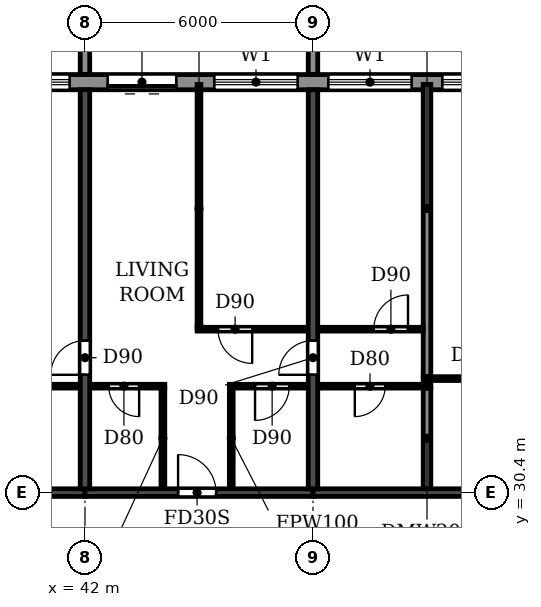
"""IFC4 building model, lengths in metres.
Left out: names, types, materials, properties, quantities, classifications, styles, units other than length and angle.
Written with IfcOpenShell. Run it as: python <this file> out.ifc"""

import sys

from ifc_helpers import new_model, si_unit, direction, frame, frame_2d, origin, place, context, subcontext, project, spatial, polyline, rectangle, outline, extrude, source, transform, mapped, element, fill, save


model = new_model("IFC4")
c1 = context("Model", 3, precision=1e-05, world=origin(), true_north=direction((0.0, 1.0)))
c2 = subcontext(c1, "Body", "Model", "MODEL_VIEW")
j1 = project(units=[si_unit("LENGTHUNIT", "METRE"), si_unit("PLANEANGLEUNIT", "RADIAN")], contexts=[c1])
p1 = place(None, origin())
s1 = spatial("IfcSite", under=j1, at=p1, CompositionType="ELEMENT")
p2 = place(p1, origin())
s2 = spatial("IfcBuilding", under=s1, at=p2, CompositionType="ELEMENT")
p3 = place(p2, frame((0.0, 0.0, 181.8)))
s3 = spatial("IfcBuildingStorey", under=s2, at=p3, CompositionType="ELEMENT", Elevation=181.8)
p4 = place(p3, frame((42.0, 30.5, 0.0), z_axis=(0.0, 0.0, 1.0), x_axis=(0.0, 1.0, 0.0)))
e1 = element("IfcWall", 1, at=p4, inside=s3, PredefinedType="SHEAR", context=c2, shape_type="SweptSolid", body=[
    extrude(rectangle(XDim=10.5, YDim=0.25, at=frame_2d((5.25, 0.0))), origin(), (0.0, 0.0, 1.0), 3.08),
])
p5 = place(p4, frame((3.0, 0.0, 0.0)))
e2 = element("IfcOpeningElement", 2, at=p5, cuts=e1, PredefinedType="OPENING", context=c2, shape_type="SweptSolid", body=[
    extrude(rectangle(XDim=0.9, YDim=2.1, at=frame_2d((0.45, 1.05))), frame((0.0, 0.135, 0.0), z_axis=(0.0, -1.0, 0.0), x_axis=(1.0, 0.0, 0.0)), (0.0, 0.0, 1.0), 0.27),
])
p6 = place(p3, frame((48.0, 30.5, 0.0), z_axis=(0.0, 0.0, 1.0), x_axis=(0.0, 1.0, 0.0)))
e3 = element("IfcWall", 3, at=p6, inside=s3, PredefinedType="SHEAR", context=c2, shape_type="SweptSolid", body=[
    extrude(rectangle(XDim=10.5, YDim=0.25, at=frame_2d((5.25, 0.0))), origin(), (0.0, 0.0, 1.0), 3.08),
])
p7 = place(p6, frame((3.0, 0.0, 0.0)))
e4 = element("IfcOpeningElement", 4, at=p7, cuts=e3, PredefinedType="OPENING", context=c2, shape_type="SweptSolid", body=[
    extrude(rectangle(XDim=0.9, YDim=2.1, at=frame_2d((0.45, 1.05))), frame((0.0, 0.135, 0.0), z_axis=(0.0, -1.0, 0.0), x_axis=(1.0, 0.0, 0.0)), (0.0, 0.0, 1.0), 0.27),
])
p8 = place(p3, frame((36.0, 30.4, 0.0), z_axis=(0.0, 0.0, 1.0), x_axis=(1.0, 0.0, 0.0)))
e5 = element("IfcWall", 5, at=p8, inside=s3, PredefinedType="SHEAR", context=c2, shape_type="SweptSolid", body=[
    extrude(rectangle(XDim=6.0, YDim=0.2, at=frame_2d((3.0, 0.0))), origin(), (0.0, 0.0, 1.0), 2.48),
])
p9 = place(p3, frame((42.0, 30.4, 0.0), z_axis=(0.0, 0.0, 1.0), x_axis=(1.0, 0.0, 0.0)))
e6 = element("IfcWall", 6, at=p9, inside=s3, PredefinedType="SHEAR", context=c2, shape_type="SweptSolid", body=[
    extrude(rectangle(XDim=6.0, YDim=0.2, at=frame_2d((3.0, 0.0))), origin(), (0.0, 0.0, 1.0), 2.48),
])
p10 = place(p9, frame((2.45, 0.0, 0.0)))
e7 = element("IfcOpeningElement", 7, at=p10, cuts=e6, PredefinedType="OPENING", context=c2, shape_type="SweptSolid", body=[
    extrude(rectangle(XDim=1.0, YDim=2.1, at=frame_2d((0.5, 1.05))), frame((0.0, 0.11, 0.0), z_axis=(0.0, -1.0, 0.0), x_axis=(1.0, 0.0, 0.0)), (0.0, 0.0, 1.0), 0.22),
])
p11 = place(p3, frame((48.0, 30.4, 0.0), z_axis=(0.0, 0.0, 1.0), x_axis=(1.0, 0.0, 0.0)))
e8 = element("IfcWall", 8, at=p11, inside=s3, PredefinedType="SHEAR", context=c2, shape_type="SweptSolid", body=[
    extrude(rectangle(XDim=6.0, YDim=0.2, at=frame_2d((3.0, 0.0))), origin(), (0.0, 0.0, 1.0), 2.48),
])
p12 = place(p3, frame((79.317, 41.2, 0.0), z_axis=(0.0, 0.0, 1.0), x_axis=(-1.0, 0.0, 0.0)))
e9 = element("IfcWall", 9, at=p12, inside=s3, PredefinedType="STANDARD", context=c2, shape_type="SweptSolid", body=[
    extrude(rectangle(XDim=56.634, YDim=0.4, at=frame_2d((28.317, 0.0))), origin(), (0.0, 0.0, 1.0), 3.08),
])
p13 = place(p12, frame((52.917, 0.0, 0.0)))
e10 = element("IfcOpeningElement", 10, at=p13, cuts=e9, PredefinedType="OPENING", context=c2, shape_type="SweptSolid", body=[
    extrude(rectangle(XDim=1.8, YDim=2.4, at=frame_2d((0.9, 1.2))), frame((0.0, 0.21, 0.0), z_axis=(0.0, -1.0, 0.0), x_axis=(1.0, 0.0, 0.0)), (0.0, 0.0, 1.0), 0.42),
])
p14 = place(p12, frame((49.717, 0.0, 0.9)))
e11 = element("IfcOpeningElement", 11, at=p14, cuts=e9, PredefinedType="OPENING", context=c2, shape_type="SweptSolid", body=[
    extrude(rectangle(XDim=2.2, YDim=1.5, at=frame_2d((1.1, 0.75))), frame((0.0, 0.21, 0.0), z_axis=(0.0, -1.0, 0.0), x_axis=(1.0, 0.0, 0.0)), (0.0, 0.0, 1.0), 0.42),
])
p15 = place(p12, frame((46.717, 0.0, 0.9)))
e12 = element("IfcOpeningElement", 12, at=p15, cuts=e9, PredefinedType="OPENING", context=c2, shape_type="SweptSolid", body=[
    extrude(rectangle(XDim=2.2, YDim=1.5, at=frame_2d((1.1, 0.75))), frame((0.0, 0.21, 0.0), z_axis=(0.0, -1.0, 0.0), x_axis=(1.0, 0.0, 0.0)), (0.0, 0.0, 1.0), 0.42),
])
p16 = place(p12, frame((43.917, 0.0, 0.0)))
e13 = element("IfcOpeningElement", 13, at=p16, cuts=e9, PredefinedType="OPENING", context=c2, shape_type="SweptSolid", body=[
    extrude(rectangle(XDim=1.8, YDim=2.4, at=frame_2d((0.9, 1.2))), frame((0.0, 0.21, 0.0), z_axis=(0.0, -1.0, 0.0), x_axis=(1.0, 0.0, 0.0)), (0.0, 0.0, 1.0), 0.42),
])
p17 = place(p12, frame((40.717, 0.0, 0.9)))
e14 = element("IfcOpeningElement", 14, at=p17, cuts=e9, PredefinedType="OPENING", context=c2, shape_type="SweptSolid", body=[
    extrude(rectangle(XDim=2.2, YDim=1.5, at=frame_2d((1.1, 0.75))), frame((0.0, 0.21, 0.0), z_axis=(0.0, -1.0, 0.0), x_axis=(1.0, 0.0, 0.0)), (0.0, 0.0, 1.0), 0.42),
])
p18 = place(p12, frame((37.717, 0.0, 0.9)))
e15 = element("IfcOpeningElement", 15, at=p18, cuts=e9, PredefinedType="OPENING", context=c2, shape_type="SweptSolid", body=[
    extrude(rectangle(XDim=2.2, YDim=1.5, at=frame_2d((1.1, 0.75))), frame((0.0, 0.21, 0.0), z_axis=(0.0, -1.0, 0.0), x_axis=(1.0, 0.0, 0.0)), (0.0, 0.0, 1.0), 0.42),
])
p19 = place(p12, frame((34.917, 0.0, 0.0)))
e16 = element("IfcOpeningElement", 16, at=p19, cuts=e9, PredefinedType="OPENING", context=c2, shape_type="SweptSolid", body=[
    extrude(rectangle(XDim=1.8, YDim=2.4, at=frame_2d((0.9, 1.2))), frame((0.0, 0.21, 0.0), z_axis=(0.0, -1.0, 0.0), x_axis=(1.0, 0.0, 0.0)), (0.0, 0.0, 1.0), 0.42),
])
p20 = place(p12, frame((31.717, 0.0, 0.9)))
e17 = element("IfcOpeningElement", 17, at=p20, cuts=e9, PredefinedType="OPENING", context=c2, shape_type="SweptSolid", body=[
    extrude(rectangle(XDim=2.2, YDim=1.5, at=frame_2d((1.1, 0.75))), frame((0.0, 0.21, 0.0), z_axis=(0.0, -1.0, 0.0), x_axis=(1.0, 0.0, 0.0)), (0.0, 0.0, 1.0), 0.42),
])
p21 = place(p12, frame((28.717, 0.0, 0.9)))
e18 = element("IfcOpeningElement", 18, at=p21, cuts=e9, PredefinedType="OPENING", context=c2, shape_type="SweptSolid", body=[
    extrude(rectangle(XDim=2.2, YDim=1.5, at=frame_2d((1.1, 0.75))), frame((0.0, 0.21, 0.0), z_axis=(0.0, -1.0, 0.0), x_axis=(1.0, 0.0, 0.0)), (0.0, 0.0, 1.0), 0.42),
])
p22 = place(p12, frame((25.717, 0.0, 0.9)))
e19 = element("IfcOpeningElement", 19, at=p22, cuts=e9, PredefinedType="OPENING", context=c2, shape_type="SweptSolid", body=[
    extrude(rectangle(XDim=2.2, YDim=1.5, at=frame_2d((1.1, 0.75))), frame((0.0, 0.21, 0.0), z_axis=(0.0, -1.0, 0.0), x_axis=(1.0, 0.0, 0.0)), (0.0, 0.0, 1.0), 0.42),
])
p23 = place(p12, frame((22.917, 0.0, 0.0)))
e20 = element("IfcOpeningElement", 20, at=p23, cuts=e9, PredefinedType="OPENING", context=c2, shape_type="SweptSolid", body=[
    extrude(rectangle(XDim=1.8, YDim=2.4, at=frame_2d((0.9, 1.2))), frame((0.0, 0.21, 0.0), z_axis=(0.0, -1.0, 0.0), x_axis=(1.0, 0.0, 0.0)), (0.0, 0.0, 1.0), 0.42),
])
p24 = place(p12, frame((19.717, 0.0, 0.9)))
e21 = element("IfcOpeningElement", 21, at=p24, cuts=e9, PredefinedType="OPENING", context=c2, shape_type="SweptSolid", body=[
    extrude(rectangle(XDim=2.2, YDim=1.5, at=frame_2d((1.1, 0.75))), frame((0.0, 0.21, 0.0), z_axis=(0.0, -1.0, 0.0), x_axis=(1.0, 0.0, 0.0)), (0.0, 0.0, 1.0), 0.42),
])
p25 = place(p12, frame((16.917, 0.0, 0.0)))
e22 = element("IfcOpeningElement", 22, at=p25, cuts=e9, PredefinedType="OPENING", context=c2, shape_type="SweptSolid", body=[
    extrude(rectangle(XDim=1.8, YDim=2.4, at=frame_2d((0.9, 1.2))), frame((0.0, 0.21, 0.0), z_axis=(0.0, -1.0, 0.0), x_axis=(1.0, 0.0, 0.0)), (0.0, 0.0, 1.0), 0.42),
])
p26 = place(p12, frame((13.717, 0.0, 0.9)))
e23 = element("IfcOpeningElement", 23, at=p26, cuts=e9, PredefinedType="OPENING", context=c2, shape_type="SweptSolid", body=[
    extrude(rectangle(XDim=2.2, YDim=1.5, at=frame_2d((1.1, 0.75))), frame((0.0, 0.21, 0.0), z_axis=(0.0, -1.0, 0.0), x_axis=(1.0, 0.0, 0.0)), (0.0, 0.0, 1.0), 0.42),
])
p27 = place(p12, frame((10.917, 0.0, 0.0)))
e24 = element("IfcOpeningElement", 24, at=p27, cuts=e9, PredefinedType="OPENING", context=c2, shape_type="SweptSolid", body=[
    extrude(rectangle(XDim=1.8, YDim=2.4, at=frame_2d((0.9, 1.2))), frame((0.0, 0.21, 0.0), z_axis=(0.0, -1.0, 0.0), x_axis=(1.0, 0.0, 0.0)), (0.0, 0.0, 1.0), 0.42),
])
p28 = place(p12, frame((7.717, 0.0, 0.9)))
e25 = element("IfcOpeningElement", 25, at=p28, cuts=e9, PredefinedType="OPENING", context=c2, shape_type="SweptSolid", body=[
    extrude(rectangle(XDim=2.2, YDim=1.5, at=frame_2d((1.1, 0.75))), frame((0.0, 0.21, 0.0), z_axis=(0.0, -1.0, 0.0), x_axis=(1.0, 0.0, 0.0)), (0.0, 0.0, 1.0), 0.42),
])
p29 = place(p12, frame((4.717, 0.0, 0.9)))
e26 = element("IfcOpeningElement", 26, at=p29, cuts=e9, PredefinedType="OPENING", context=c2, shape_type="SweptSolid", body=[
    extrude(rectangle(XDim=2.2, YDim=1.5, at=frame_2d((1.1, 0.75))), frame((0.0, 0.21, 0.0), z_axis=(0.0, -1.0, 0.0), x_axis=(1.0, 0.0, 0.0)), (0.0, 0.0, 1.0), 0.42),
])
p30 = place(p12, frame((1.917, 0.0, 0.0)))
e27 = element("IfcOpeningElement", 27, at=p30, cuts=e9, PredefinedType="OPENING", context=c2, shape_type="SweptSolid", body=[
    extrude(rectangle(XDim=1.8, YDim=2.4, at=frame_2d((0.9, 1.2))), frame((0.0, 0.21, 0.0), z_axis=(0.0, -1.0, 0.0), x_axis=(1.0, 0.0, 0.0)), (0.0, 0.0, 1.0), 0.42),
])
m1 = source(origin(), c2, "Body", "SweptSolid", [
    extrude(outline(polyline([(0.0, 0.0), (0.25, 0.0), (0.25, 3.1), (0.0, 3.1), (0.0, 0.0)])), origin(), (0.0, 0.0, 1.0), 3.1),
])
for number, where in (
    (28, (41.875, 41.4, 0.0)),
    (29, (47.875, 41.4, 0.0)),
):
    element("IfcWall", number, at=place(p3, frame(where)), inside=s3, PredefinedType="STANDARD", context=c2, shape_type="MappedRepresentation", body=[
        mapped(m1, transform((0.0, 0.0, 0.0))),
    ])
p31 = place(p3, frame((51.0, 30.51, 0.0), z_axis=(0.0, 0.0, 1.0), x_axis=(0.0, 1.0, 0.0)))
e30 = element("IfcWall", 30, at=p31, inside=s3, PredefinedType="PARTITIONING", context=c2, shape_type="SweptSolid", body=[
    extrude(rectangle(XDim=2.64, YDim=0.2, at=frame_2d((1.32, 0.0))), origin(), (0.0, 0.0, 1.0), 3.08),
])
p32 = place(p3, frame((51.0, 33.45, 0.0), z_axis=(0.0, 0.0, 1.0), x_axis=(0.0, 1.0, 0.0)))
e31 = element("IfcWall", 31, at=p32, inside=s3, PredefinedType="PARTITIONING", context=c2, shape_type="SweptSolid", body=[
    extrude(rectangle(XDim=7.69, YDim=0.2, at=frame_2d((3.845, 0.0))), origin(), (0.0, 0.0, 1.0), 3.08),
])
p33 = place(p3, frame((38.9, 33.2, 0.0), z_axis=(0.0, 0.0, 1.0), x_axis=(1.0, 0.0, 0.0)))
e32 = element("IfcWall", 32, at=p33, inside=s3, PredefinedType="PARTITIONING", context=c2, shape_type="SweptSolid", body=[
    extrude(rectangle(XDim=2.965, YDim=0.1, at=frame_2d((1.482, 0.0))), origin(), (0.0, 0.0, 1.0), 3.08),
])
p34 = place(p33, frame((1.2, 0.0, 0.0)))
e33 = element("IfcOpeningElement", 33, at=p34, cuts=e32, PredefinedType="OPENING", context=c2, shape_type="SweptSolid", body=[
    extrude(rectangle(XDim=0.8, YDim=2.1, at=frame_2d((0.4, 1.05))), frame((0.0, 0.06, 0.0), z_axis=(0.0, -1.0, 0.0), x_axis=(1.0, 0.0, 0.0)), (0.0, 0.0, 1.0), 0.12),
])
p35 = place(p3, frame((42.135, 33.2, 0.0), z_axis=(0.0, 0.0, 1.0), x_axis=(1.0, 0.0, 0.0)))
e34 = element("IfcWall", 34, at=p35, inside=s3, PredefinedType="PARTITIONING", context=c2, shape_type="SweptSolid", body=[
    extrude(rectangle(XDim=1.965, YDim=0.1, at=frame_2d((0.982, 0.0))), origin(), (0.0, 0.0, 1.0), 3.08),
])
p36 = place(p35, frame((0.49, 0.0, 0.0)))
e35 = element("IfcOpeningElement", 35, at=p36, cuts=e34, PredefinedType="OPENING", context=c2, shape_type="SweptSolid", body=[
    extrude(rectangle(XDim=0.8, YDim=2.1, at=frame_2d((0.4, 1.05))), frame((0.0, 0.06, 0.0), z_axis=(0.0, -1.0, 0.0), x_axis=(1.0, 0.0, 0.0)), (0.0, 0.0, 1.0), 0.12),
])
p37 = place(p3, frame((45.8, 33.2, 0.0), z_axis=(0.0, 0.0, 1.0), x_axis=(1.0, 0.0, 0.0)))
e36 = element("IfcWall", 36, at=p37, inside=s3, PredefinedType="PARTITIONING", context=c2, shape_type="SweptSolid", body=[
    extrude(rectangle(XDim=2.065, YDim=0.1, at=frame_2d((1.032, 0.0))), origin(), (0.0, 0.0, 1.0), 3.08),
])
p38 = place(p37, frame((0.675, 0.0, 0.0)))
e37 = element("IfcOpeningElement", 37, at=p38, cuts=e36, PredefinedType="OPENING", context=c2, shape_type="SweptSolid", body=[
    extrude(rectangle(XDim=0.9, YDim=2.1, at=frame_2d((0.45, 1.05))), frame((0.0, 0.06, 0.0), z_axis=(0.0, -1.0, 0.0), x_axis=(1.0, 0.0, 0.0)), (0.0, 0.0, 1.0), 0.12),
])
p39 = place(p3, frame((48.135, 33.2, 0.0), z_axis=(0.0, 0.0, 1.0), x_axis=(1.0, 0.0, 0.0)))
e38 = element("IfcWall", 38, at=p39, inside=s3, PredefinedType="PARTITIONING", context=c2, shape_type="SweptSolid", body=[
    extrude(rectangle(XDim=2.965, YDim=0.1, at=frame_2d((1.482, 0.0))), origin(), (0.0, 0.0, 1.0), 3.08),
])
p40 = place(p39, frame((0.965, 0.0, 0.0)))
e39 = element("IfcOpeningElement", 39, at=p40, cuts=e38, PredefinedType="OPENING", context=c2, shape_type="SweptSolid", body=[
    extrude(rectangle(XDim=0.8, YDim=2.1, at=frame_2d((0.4, 1.05))), frame((0.0, 0.06, 0.0), z_axis=(0.0, -1.0, 0.0), x_axis=(1.0, 0.0, 0.0)), (0.0, 0.0, 1.0), 0.12),
])
p41 = place(p3, frame((50.9, 33.4, 0.0), z_axis=(0.0, 0.0, 1.0), x_axis=(1.0, 0.0, 0.0)))
e40 = element("IfcWall", 40, at=p41, inside=s3, PredefinedType="PARTITIONING", context=c2, shape_type="SweptSolid", body=[
    extrude(rectangle(XDim=2.965, YDim=0.1, at=frame_2d((1.482, 0.0))), origin(), (0.0, 0.0, 1.0), 3.08),
])
p42 = place(p41, frame((1.2, 0.0, 0.0)))
e41 = element("IfcOpeningElement", 41, at=p42, cuts=e40, PredefinedType="OPENING", context=c2, shape_type="SweptSolid", body=[
    extrude(rectangle(XDim=0.8, YDim=2.1, at=frame_2d((0.4, 1.05))), frame((0.0, 0.06, 0.0), z_axis=(0.0, -1.0, 0.0), x_axis=(1.0, 0.0, 0.0)), (0.0, 0.0, 1.0), 0.12),
])
p43 = place(p3, frame((44.95, 34.7, 0.0), z_axis=(0.0, 0.0, 1.0), x_axis=(1.0, 0.0, 0.0)))
e42 = element("IfcWall", 42, at=p43, inside=s3, PredefinedType="PARTITIONING", context=c2, shape_type="SweptSolid", body=[
    extrude(rectangle(XDim=2.915, YDim=0.1, at=frame_2d((1.458, 0.0))), origin(), (0.0, 0.0, 1.0), 3.08),
])
p44 = place(p43, frame((0.55, 0.0, 0.0)))
e43 = element("IfcOpeningElement", 43, at=p44, cuts=e42, PredefinedType="OPENING", context=c2, shape_type="SweptSolid", body=[
    extrude(rectangle(XDim=0.9, YDim=2.1, at=frame_2d((0.45, 1.05))), frame((0.0, 0.06, 0.0), z_axis=(0.0, -1.0, 0.0), x_axis=(1.0, 0.0, 0.0)), (0.0, 0.0, 1.0), 0.12),
])
p45 = place(p3, frame((48.135, 34.7, 0.0), z_axis=(0.0, 0.0, 1.0), x_axis=(1.0, 0.0, 0.0)))
e44 = element("IfcWall", 44, at=p45, inside=s3, PredefinedType="PARTITIONING", context=c2, shape_type="SweptSolid", body=[
    extrude(rectangle(XDim=2.765, YDim=0.1, at=frame_2d((1.382, 0.0))), origin(), (0.0, 0.0, 1.0), 3.08),
])
p46 = place(p45, frame((1.465, 0.0, 0.0)))
e45 = element("IfcOpeningElement", 45, at=p46, cuts=e44, PredefinedType="OPENING", context=c2, shape_type="SweptSolid", body=[
    extrude(rectangle(XDim=0.9, YDim=2.1, at=frame_2d((0.45, 1.05))), frame((0.0, 0.06, 0.0), z_axis=(0.0, -1.0, 0.0), x_axis=(1.0, 0.0, 0.0)), (0.0, 0.0, 1.0), 0.12),
])
p47 = place(p3, frame((44.05, 30.51, 0.0), z_axis=(0.0, 0.0, 1.0), x_axis=(0.0, 1.0, 0.0)))
e46 = element("IfcWall", 46, at=p47, inside=s3, PredefinedType="PARTITIONING", context=c2, shape_type="SweptSolid", body=[
    extrude(rectangle(XDim=2.64, YDim=0.1, at=frame_2d((1.32, 0.0))), origin(), (0.0, 0.0, 1.0), 3.08),
])
p48 = place(p3, frame((45.0, 34.75, 0.0), z_axis=(0.0, 0.0, 1.0), x_axis=(0.0, 1.0, 0.0)))
e47 = element("IfcWall", 47, at=p48, inside=s3, PredefinedType="PARTITIONING", context=c2, shape_type="SweptSolid", body=[
    extrude(rectangle(XDim=6.39, YDim=0.1, at=frame_2d((3.195, 0.0))), origin(), (0.0, 0.0, 1.0), 3.08),
])
p49 = place(p3, frame((45.85, 30.51, 0.0), z_axis=(0.0, 0.0, 1.0), x_axis=(0.0, 1.0, 0.0)))
e48 = element("IfcWall", 48, at=p49, inside=s3, PredefinedType="PARTITIONING", context=c2, shape_type="SweptSolid", body=[
    extrude(rectangle(XDim=2.64, YDim=0.1, at=frame_2d((1.32, 0.0))), origin(), (0.0, 0.0, 1.0), 3.08),
])
p50 = place(p18, origin())
e49 = element("IfcWindow", 49, at=p50, inside=s3, PartitioningType="DOUBLE_PANEL_HORIZONTAL", PredefinedType="WINDOW", context=c2, shape_type="SweptSolid", body=[
    extrude(rectangle(XDim=2.2, YDim=1.5, at=frame_2d((1.1, 0.75))), frame((0.0, 0.03, 0.0), z_axis=(0.0, -1.0, 0.0), x_axis=(1.0, 0.0, 0.0)), (0.0, 0.0, 1.0), 0.06),
])
fill(e15, e49)
p51 = place(p19, origin())
e50 = element("IfcDoor", 50, at=p51, inside=s3, OperationType="DOUBLE_DOOR_SLIDING", PredefinedType="DOOR", context=c2, shape_type="SweptSolid", body=[
    extrude(rectangle(XDim=1.8, YDim=2.4, at=frame_2d((0.9, 1.2))), frame((0.0, 0.025, 0.0), z_axis=(0.0, -1.0, 0.0), x_axis=(1.0, 0.0, 0.0)), (0.0, 0.0, 1.0), 0.05),
])
fill(e16, e50)
p52 = place(p20, origin())
e51 = element("IfcWindow", 51, at=p52, inside=s3, PartitioningType="DOUBLE_PANEL_HORIZONTAL", PredefinedType="WINDOW", context=c2, shape_type="SweptSolid", body=[
    extrude(rectangle(XDim=2.2, YDim=1.5, at=frame_2d((1.1, 0.75))), frame((0.0, 0.03, 0.0), z_axis=(0.0, -1.0, 0.0), x_axis=(1.0, 0.0, 0.0)), (0.0, 0.0, 1.0), 0.06),
])
fill(e17, e51)
p53 = place(p21, origin())
e52 = element("IfcWindow", 52, at=p53, inside=s3, PartitioningType="DOUBLE_PANEL_HORIZONTAL", PredefinedType="WINDOW", context=c2, shape_type="SweptSolid", body=[
    extrude(rectangle(XDim=2.2, YDim=1.5, at=frame_2d((1.1, 0.75))), frame((0.0, 0.03, 0.0), z_axis=(0.0, -1.0, 0.0), x_axis=(1.0, 0.0, 0.0)), (0.0, 0.0, 1.0), 0.06),
])
fill(e18, e52)
p54 = place(p22, origin())
e53 = element("IfcWindow", 53, at=p54, inside=s3, PartitioningType="DOUBLE_PANEL_HORIZONTAL", PredefinedType="WINDOW", context=c2, shape_type="SweptSolid", body=[
    extrude(rectangle(XDim=2.2, YDim=1.5, at=frame_2d((1.1, 0.75))), frame((0.0, 0.03, 0.0), z_axis=(0.0, -1.0, 0.0), x_axis=(1.0, 0.0, 0.0)), (0.0, 0.0, 1.0), 0.06),
])
fill(e19, e53)
p55 = place(p40, frame((0.8, 0.0, 0.0), z_axis=(0.0, 0.0, 1.0), x_axis=(-1.0, 0.0, 0.0)))
e54 = element("IfcDoor", 54, at=p55, inside=s3, OperationType="SINGLE_SWING_RIGHT", PredefinedType="DOOR", context=c2, shape_type="SweptSolid", body=[
    extrude(rectangle(XDim=0.8, YDim=2.1, at=frame_2d((0.4, 1.05))), frame((0.0, 0.025, 0.0), z_axis=(0.0, -1.0, 0.0), x_axis=(1.0, 0.0, 0.0)), (0.0, 0.0, 1.0), 0.05),
])
fill(e39, e54)
p56 = place(p46, origin())
e55 = element("IfcDoor", 55, at=p56, inside=s3, OperationType="SINGLE_SWING_RIGHT", PredefinedType="DOOR", context=c2, shape_type="SweptSolid", body=[
    extrude(rectangle(XDim=0.9, YDim=2.1, at=frame_2d((0.45, 1.05))), frame((0.0, 0.025, 0.0), z_axis=(0.0, -1.0, 0.0), x_axis=(1.0, 0.0, 0.0)), (0.0, 0.0, 1.0), 0.05),
])
fill(e45, e55)
p57 = place(p5, origin())
e56 = element("IfcDoor", 56, at=p57, inside=s3, OperationType="SINGLE_SWING_LEFT", PredefinedType="DOOR", context=c2, shape_type="SweptSolid", body=[
    extrude(rectangle(XDim=0.9, YDim=2.1, at=frame_2d((0.45, 1.05))), frame((0.0, 0.025, 0.0), z_axis=(0.0, -1.0, 0.0), x_axis=(1.0, 0.0, 0.0)), (0.0, 0.0, 1.0), 0.05),
])
fill(e2, e56)
p58 = place(p36, frame((0.8, 0.0, 0.0), z_axis=(0.0, 0.0, 1.0), x_axis=(-1.0, 0.0, 0.0)))
e57 = element("IfcDoor", 57, at=p58, inside=s3, OperationType="SINGLE_SWING_LEFT", PredefinedType="DOOR", context=c2, shape_type="SweptSolid", body=[
    extrude(rectangle(XDim=0.8, YDim=2.1, at=frame_2d((0.4, 1.05))), frame((0.0, 0.025, 0.0), z_axis=(0.0, -1.0, 0.0), x_axis=(1.0, 0.0, 0.0)), (0.0, 0.0, 1.0), 0.05),
])
fill(e35, e57)
p59 = place(p10, origin())
e58 = element("IfcDoor", 58, at=p59, inside=s3, OperationType="SINGLE_SWING_LEFT", PredefinedType="DOOR", context=c2, shape_type="SweptSolid", body=[
    extrude(rectangle(XDim=1.0, YDim=2.1, at=frame_2d((0.5, 1.05))), frame((0.0, 0.025, 0.0), z_axis=(0.0, -1.0, 0.0), x_axis=(1.0, 0.0, 0.0)), (0.0, 0.0, 1.0), 0.05),
])
fill(e7, e58)
p60 = place(p44, frame((0.9, 0.0, 0.0), z_axis=(0.0, 0.0, 1.0), x_axis=(-1.0, 0.0, 0.0)))
e59 = element("IfcDoor", 59, at=p60, inside=s3, OperationType="SINGLE_SWING_LEFT", PredefinedType="DOOR", context=c2, shape_type="SweptSolid", body=[
    extrude(rectangle(XDim=0.9, YDim=2.1, at=frame_2d((0.45, 1.05))), frame((0.0, 0.025, 0.0), z_axis=(0.0, -1.0, 0.0), x_axis=(1.0, 0.0, 0.0)), (0.0, 0.0, 1.0), 0.05),
])
fill(e43, e59)
p61 = place(p38, frame((0.9, 0.0, 0.0), z_axis=(0.0, 0.0, 1.0), x_axis=(-1.0, 0.0, 0.0)))
e60 = element("IfcDoor", 60, at=p61, inside=s3, OperationType="SINGLE_SWING_RIGHT", PredefinedType="DOOR", context=c2, shape_type="SweptSolid", body=[
    extrude(rectangle(XDim=0.9, YDim=2.1, at=frame_2d((0.45, 1.05))), frame((0.0, 0.025, 0.0), z_axis=(0.0, -1.0, 0.0), x_axis=(1.0, 0.0, 0.0)), (0.0, 0.0, 1.0), 0.05),
])
fill(e37, e60)
p62 = place(p7, origin())
e61 = element("IfcDoor", 61, at=p62, inside=s3, OperationType="SINGLE_SWING_LEFT", PredefinedType="DOOR", context=c2, shape_type="SweptSolid", body=[
    extrude(rectangle(XDim=0.9, YDim=2.1, at=frame_2d((0.45, 1.05))), frame((0.0, 0.025, 0.0), z_axis=(0.0, -1.0, 0.0), x_axis=(1.0, 0.0, 0.0)), (0.0, 0.0, 1.0), 0.05),
])
fill(e4, e61)
save(model, sys.argv[1])
